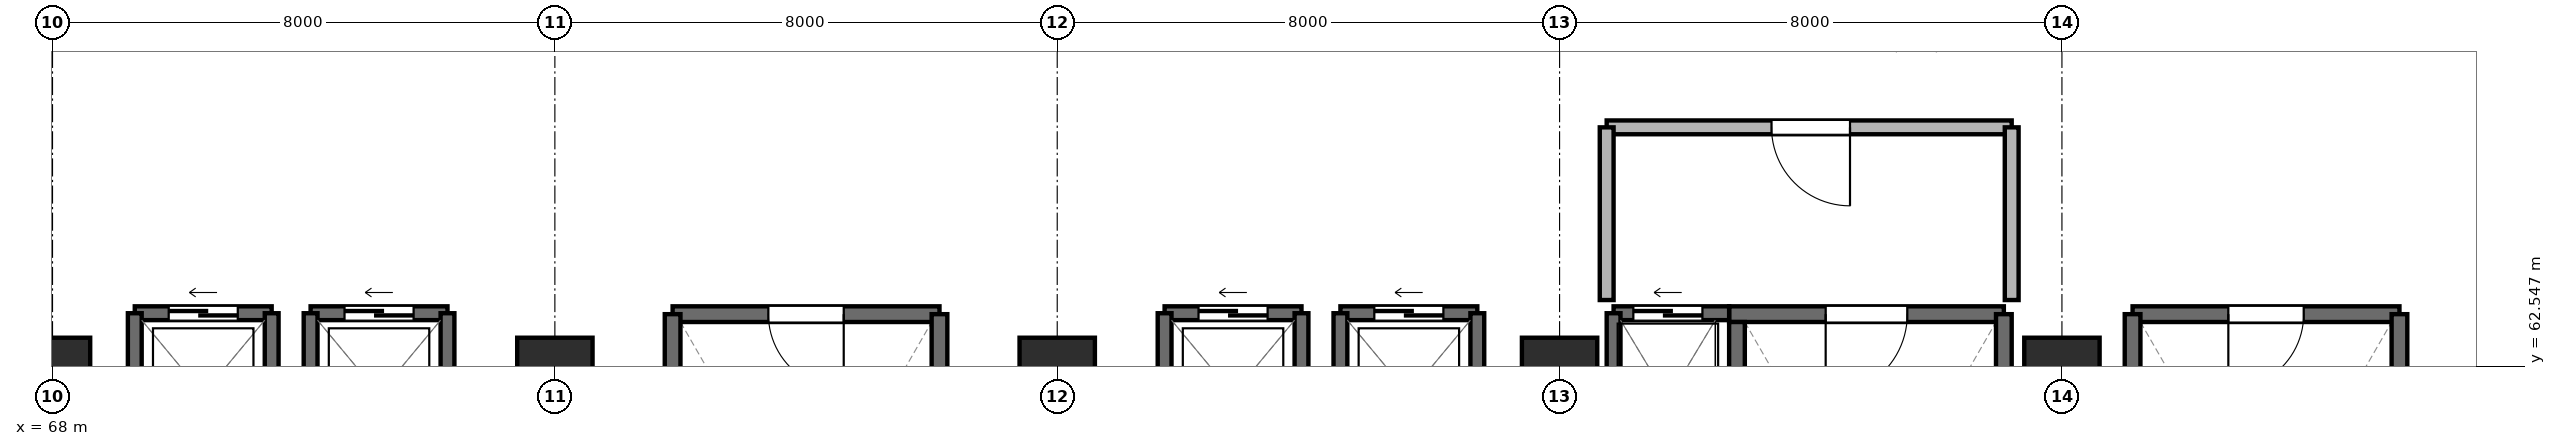
"""IFC4 building model, lengths in metres.
Left out: names, types, materials, properties, quantities, classifications, styles, units other than length and angle.
Written with IfcOpenShell. Run it as: python <this file> out.ifc"""

import sys

from ifc_helpers import new_model, si_unit, direction, frame, frame_2d, origin, origin_2d, place, context, subcontext, project, spatial, rectangle, extrude, element, fill, save


model = new_model("IFC4")
c1 = context("Model", 3, precision=1e-05, world=origin(), true_north=direction((0.0, 1.0)))
c2 = subcontext(c1, "Body", "Model", "MODEL_VIEW")
j1 = project(units=[si_unit("LENGTHUNIT", "METRE"), si_unit("PLANEANGLEUNIT", "RADIAN")], contexts=[c1])
p1 = place(None, origin())
s1 = spatial("IfcSite", under=j1, at=p1, CompositionType="ELEMENT")
p2 = place(p1, origin())
s2 = spatial("IfcBuilding", under=s1, at=p2, CompositionType="ELEMENT")
p3 = place(p2, frame((0.0, 0.0, -4.5)))
s3 = spatial("IfcBuildingStorey", under=s2, at=p3, CompositionType="ELEMENT", Elevation=-4.5)
for number, where, z_axis, x_axis in (
    (1, (68.0, 62.4, -0.32), (0.0, 0.0, 1.0), (1.0, 0.0, 0.0)),
    (2, (76.0, 62.4, -0.32), (0.0, 0.0, 1.0), (1.0, 0.0, 0.0)),
    (3, (84.0, 62.4, -0.32), (0.0, 0.0, 1.0), (1.0, 0.0, 0.0)),
    (4, (92.0, 62.4, -0.32), (0.0, 0.0, 1.0), (1.0, 0.0, 0.0)),
    (5, (100.0, 62.4, -0.32), (0.0, 0.0, 1.0), (1.0, 0.0, 0.0)),
):
    element("IfcColumn", number, at=place(p3, frame(where, z_axis=z_axis, x_axis=x_axis)), inside=s3, PredefinedType="COLUMN", context=c2, shape_type="SweptSolid", body=[
        extrude(rectangle(XDim=1.2, YDim=1.2, at=origin_2d()), origin(), (0.0, 0.0, 1.0), 4.47),
    ])
p4 = place(p3, frame((99.075, 63.375, 0.0), z_axis=(0.0, 0.0, 1.0), x_axis=(-1.0, 0.0, 0.0)))
e6 = element("IfcWall", 6, at=p4, inside=s3, PredefinedType="SHEAR", context=c2, shape_type="SweptSolid", body=[
    extrude(rectangle(XDim=4.375, YDim=0.25, at=frame_2d((2.188, 0.0))), origin(), (0.0, 0.0, 1.0), 4.15),
])
p5 = place(p4, frame((1.538, 0.0, 0.0)))
e7 = element("IfcOpeningElement", 7, at=p5, cuts=e6, PredefinedType="OPENING", context=c2, shape_type="SweptSolid", body=[
    extrude(rectangle(XDim=1.3, YDim=2.2, at=frame_2d((0.65, 1.1))), frame((0.0, 0.137, 0.0), z_axis=(0.0, -1.0, 0.0), x_axis=(1.0, 0.0, 0.0)), (0.0, 0.0, 1.0), 0.274),
])
p6 = place(p3, frame((94.825, 63.25, 0.0), z_axis=(0.0, 0.0, 1.0), x_axis=(0.0, -1.0, 0.0)))
e8 = element("IfcWall", 8, at=p6, inside=s3, PredefinedType="SHEAR", context=c2, shape_type="SweptSolid", body=[
    extrude(rectangle(XDim=7.075, YDim=0.25, at=frame_2d((3.538, 0.0))), origin(), (0.0, 0.0, 1.0), 4.15),
])
p7 = place(p3, frame((99.075, 56.175, 0.0), z_axis=(0.0, 0.0, 1.0), x_axis=(0.0, 1.0, 0.0)))
e9 = element("IfcWall", 9, at=p7, inside=s3, PredefinedType="SHEAR", context=c2, shape_type="SweptSolid", body=[
    extrude(rectangle(XDim=7.2, YDim=0.25, at=frame_2d((3.6, 0.0))), origin(), (0.0, 0.0, 1.0), 4.15),
])
p8 = place(p3, frame((82.125, 63.375, 0.0), z_axis=(0.0, 0.0, 1.0), x_axis=(-1.0, 0.0, 0.0)))
e10 = element("IfcWall", 10, at=p8, inside=s3, PredefinedType="SHEAR", context=c2, shape_type="SweptSolid", body=[
    extrude(rectangle(XDim=4.25, YDim=0.25, at=frame_2d((2.125, 0.0))), origin(), (0.0, 0.0, 1.0), 4.15),
])
p9 = place(p8, frame((1.525, 0.0, 0.0)))
e11 = element("IfcOpeningElement", 11, at=p9, cuts=e10, PredefinedType="OPENING", context=c2, shape_type="SweptSolid", body=[
    extrude(rectangle(XDim=1.2, YDim=2.2, at=frame_2d((0.6, 1.1))), frame((0.0, 0.137, 0.0), z_axis=(0.0, -1.0, 0.0), x_axis=(1.0, 0.0, 0.0)), (0.0, 0.0, 1.0), 0.274),
])
for number, where, z_axis, x_axis in (
    (12, (77.875, 63.375, 0.0), (0.0, 0.0, 1.0), (0.0, -1.0, 0.0)),
    (13, (82.125, 56.175, 0.0), (0.0, 0.0, 1.0), (0.0, 1.0, 0.0)),
):
    element("IfcWall", number, at=place(p3, frame(where, z_axis=z_axis, x_axis=x_axis)), inside=s3, PredefinedType="SHEAR", context=c2, shape_type="SweptSolid", body=[
        extrude(rectangle(XDim=7.2, YDim=0.25, at=frame_2d((3.6, 0.0))), origin(), (0.0, 0.0, 1.0), 4.15),
    ])
p10 = place(p3, frame((105.375, 63.375, 0.0), z_axis=(0.0, 0.0, 1.0), x_axis=(-1.0, 0.0, 0.0)))
e14 = element("IfcWall", 14, at=p10, inside=s3, PredefinedType="SHEAR", context=c2, shape_type="SweptSolid", body=[
    extrude(rectangle(XDim=4.25, YDim=0.25, at=frame_2d((2.125, 0.0))), origin(), (0.0, 0.0, 1.0), 4.15),
])
p11 = place(p10, frame((1.525, 0.0, 0.0)))
e15 = element("IfcOpeningElement", 15, at=p11, cuts=e14, PredefinedType="OPENING", context=c2, shape_type="SweptSolid", body=[
    extrude(rectangle(XDim=1.2, YDim=2.2, at=frame_2d((0.6, 1.1))), frame((0.0, 0.137, 0.0), z_axis=(0.0, -1.0, 0.0), x_axis=(1.0, 0.0, 0.0)), (0.0, 0.0, 1.0), 0.274),
])
for number, where, z_axis, x_axis in (
    (16, (101.125, 63.375, 0.0), (0.0, 0.0, 1.0), (0.0, -1.0, 0.0)),
    (17, (105.375, 56.175, 0.0), (0.0, 0.0, 1.0), (0.0, 1.0, 0.0)),
):
    element("IfcWall", number, at=place(p3, frame(where, z_axis=z_axis, x_axis=x_axis)), inside=s3, PredefinedType="SHEAR", context=c2, shape_type="SweptSolid", body=[
        extrude(rectangle(XDim=7.2, YDim=0.25, at=frame_2d((3.6, 0.0))), origin(), (0.0, 0.0, 1.0), 4.15),
    ])
p12 = place(p3, frame((94.7, 63.39, 0.0), z_axis=(0.0, 0.0, 1.0), x_axis=(-1.0, 0.0, 0.0)))
e18 = element("IfcWall", 18, at=p12, inside=s3, PredefinedType="SHEAR", context=c2, shape_type="SweptSolid", body=[
    extrude(rectangle(XDim=1.84, YDim=0.22, at=frame_2d((0.92, 0.0))), origin(), (0.0, 0.0, 1.0), 4.15),
])
p13 = place(p12, frame((0.425, 0.0, 0.0)))
e19 = element("IfcOpeningElement", 19, at=p13, cuts=e18, PredefinedType="OPENING", context=c2, shape_type="SweptSolid", body=[
    extrude(rectangle(XDim=1.1, YDim=2.2, at=frame_2d((0.55, 1.1))), frame((0.0, 0.122, 0.0), z_axis=(0.0, -1.0, 0.0), x_axis=(1.0, 0.0, 0.0)), (0.0, 0.0, 1.0), 0.244),
])
p14 = place(p3, frame((92.86, 63.39, 0.0), z_axis=(0.0, 0.0, 1.0), x_axis=(0.0, -1.0, 0.0)))
e20 = element("IfcWall", 20, at=p14, inside=s3, PredefinedType="SHEAR", context=c2, shape_type="SweptSolid", body=[
    extrude(rectangle(XDim=2.73, YDim=0.22, at=frame_2d((1.365, 0.0))), origin(), (0.0, 0.0, 1.0), 4.15),
])
p15 = place(p3, frame((71.49, 63.39, 0.0), z_axis=(0.0, 0.0, 1.0), x_axis=(-1.0, 0.0, 0.0)))
e21 = element("IfcWall", 21, at=p15, inside=s3, PredefinedType="SHEAR", context=c2, shape_type="SweptSolid", body=[
    extrude(rectangle(XDim=2.18, YDim=0.22, at=frame_2d((1.09, 0.0))), origin(), (0.0, 0.0, 1.0), 4.15),
])
p16 = place(p15, frame((0.54, 0.0, 0.0)))
e22 = element("IfcOpeningElement", 22, at=p16, cuts=e21, PredefinedType="OPENING", context=c2, shape_type="SweptSolid", body=[
    extrude(rectangle(XDim=1.1, YDim=2.2, at=frame_2d((0.55, 1.1))), frame((0.0, 0.122, 0.0), z_axis=(0.0, -1.0, 0.0), x_axis=(1.0, 0.0, 0.0)), (0.0, 0.0, 1.0), 0.244),
])
for number, where, z_axis, x_axis in (
    (23, (69.31, 63.39, 0.0), (0.0, 0.0, 1.0), (0.0, -1.0, 0.0)),
    (24, (71.49, 60.81, 0.0), (0.0, 0.0, 1.0), (0.0, 1.0, 0.0)),
):
    element("IfcWall", number, at=place(p3, frame(where, z_axis=z_axis, x_axis=x_axis)), inside=s3, PredefinedType="SHEAR", context=c2, shape_type="SweptSolid", body=[
        extrude(rectangle(XDim=2.58, YDim=0.22, at=frame_2d((1.29, 0.0))), origin(), (0.0, 0.0, 1.0), 4.15),
    ])
p17 = place(p3, frame((74.29, 63.39, 0.0), z_axis=(0.0, 0.0, 1.0), x_axis=(-1.0, 0.0, 0.0)))
e25 = element("IfcWall", 25, at=p17, inside=s3, PredefinedType="SHEAR", context=c2, shape_type="SweptSolid", body=[
    extrude(rectangle(XDim=2.18, YDim=0.22, at=frame_2d((1.09, 0.0))), origin(), (0.0, 0.0, 1.0), 4.15),
])
p18 = place(p17, frame((0.54, 0.0, 0.0)))
e26 = element("IfcOpeningElement", 26, at=p18, cuts=e25, PredefinedType="OPENING", context=c2, shape_type="SweptSolid", body=[
    extrude(rectangle(XDim=1.1, YDim=2.2, at=frame_2d((0.55, 1.1))), frame((0.0, 0.122, 0.0), z_axis=(0.0, -1.0, 0.0), x_axis=(1.0, 0.0, 0.0)), (0.0, 0.0, 1.0), 0.244),
])
for number, where, z_axis, x_axis in (
    (27, (72.11, 63.39, 0.0), (0.0, 0.0, 1.0), (0.0, -1.0, 0.0)),
    (28, (74.29, 60.81, 0.0), (0.0, 0.0, 1.0), (0.0, 1.0, 0.0)),
):
    element("IfcWall", number, at=place(p3, frame(where, z_axis=z_axis, x_axis=x_axis)), inside=s3, PredefinedType="SHEAR", context=c2, shape_type="SweptSolid", body=[
        extrude(rectangle(XDim=2.58, YDim=0.22, at=frame_2d((1.29, 0.0))), origin(), (0.0, 0.0, 1.0), 4.15),
    ])
p19 = place(p3, frame((87.89, 63.39, 0.0), z_axis=(0.0, 0.0, 1.0), x_axis=(-1.0, 0.0, 0.0)))
e29 = element("IfcWall", 29, at=p19, inside=s3, PredefinedType="SHEAR", context=c2, shape_type="SweptSolid", body=[
    extrude(rectangle(XDim=2.18, YDim=0.22, at=frame_2d((1.09, 0.0))), origin(), (0.0, 0.0, 1.0), 4.15),
])
p20 = place(p19, frame((0.54, 0.0, 0.0)))
e30 = element("IfcOpeningElement", 30, at=p20, cuts=e29, PredefinedType="OPENING", context=c2, shape_type="SweptSolid", body=[
    extrude(rectangle(XDim=1.1, YDim=2.2, at=frame_2d((0.55, 1.1))), frame((0.0, 0.122, 0.0), z_axis=(0.0, -1.0, 0.0), x_axis=(1.0, 0.0, 0.0)), (0.0, 0.0, 1.0), 0.244),
])
for number, where, z_axis, x_axis in (
    (31, (85.71, 63.39, 0.0), (0.0, 0.0, 1.0), (0.0, -1.0, 0.0)),
    (32, (87.89, 60.81, 0.0), (0.0, 0.0, 1.0), (0.0, 1.0, 0.0)),
):
    element("IfcWall", number, at=place(p3, frame(where, z_axis=z_axis, x_axis=x_axis)), inside=s3, PredefinedType="SHEAR", context=c2, shape_type="SweptSolid", body=[
        extrude(rectangle(XDim=2.58, YDim=0.22, at=frame_2d((1.29, 0.0))), origin(), (0.0, 0.0, 1.0), 4.15),
    ])
p21 = place(p3, frame((90.69, 63.39, 0.0), z_axis=(0.0, 0.0, 1.0), x_axis=(-1.0, 0.0, 0.0)))
e33 = element("IfcWall", 33, at=p21, inside=s3, PredefinedType="SHEAR", context=c2, shape_type="SweptSolid", body=[
    extrude(rectangle(XDim=2.18, YDim=0.22, at=frame_2d((1.09, 0.0))), origin(), (0.0, 0.0, 1.0), 4.15),
])
p22 = place(p21, frame((0.54, 0.0, 0.0)))
e34 = element("IfcOpeningElement", 34, at=p22, cuts=e33, PredefinedType="OPENING", context=c2, shape_type="SweptSolid", body=[
    extrude(rectangle(XDim=1.1, YDim=2.2, at=frame_2d((0.55, 1.1))), frame((0.0, 0.122, 0.0), z_axis=(0.0, -1.0, 0.0), x_axis=(1.0, 0.0, 0.0)), (0.0, 0.0, 1.0), 0.244),
])
for number, where, z_axis, x_axis in (
    (35, (88.51, 63.39, 0.0), (0.0, 0.0, 1.0), (0.0, -1.0, 0.0)),
    (36, (90.69, 60.81, 0.0), (0.0, 0.0, 1.0), (0.0, 1.0, 0.0)),
):
    element("IfcWall", number, at=place(p3, frame(where, z_axis=z_axis, x_axis=x_axis)), inside=s3, PredefinedType="SHEAR", context=c2, shape_type="SweptSolid", body=[
        extrude(rectangle(XDim=2.58, YDim=0.22, at=frame_2d((1.29, 0.0))), origin(), (0.0, 0.0, 1.0), 4.15),
    ])
p23 = place(p3, frame((92.75, 66.35, 0.0), z_axis=(0.0, 0.0, 1.0), x_axis=(1.0, 0.0, 0.0)))
e37 = element("IfcWall", 37, at=p23, inside=s3, PredefinedType="PARTITIONING", context=c2, shape_type="SweptSolid", body=[
    extrude(rectangle(XDim=6.45, YDim=0.22, at=frame_2d((3.225, 0.0))), origin(), (0.0, 0.0, 1.0), 3.78),
])
p24 = place(p23, frame((2.625, 0.0, 0.0)))
e38 = element("IfcOpeningElement", 38, at=p24, cuts=e37, PredefinedType="OPENING", context=c2, shape_type="SweptSolid", body=[
    extrude(rectangle(XDim=1.25, YDim=2.2, at=frame_2d((0.625, 1.1))), frame((0.0, 0.122, 0.0), z_axis=(0.0, -1.0, 0.0), x_axis=(1.0, 0.0, 0.0)), (0.0, 0.0, 1.0), 0.244),
])
for number, where, z_axis, x_axis in (
    (39, (92.75, 63.6, 0.0), (0.0, 0.0, 1.0), (0.0, 1.0, 0.0)),
    (40, (99.2, 63.6, 0.0), (0.0, 0.0, 1.0), (0.0, 1.0, 0.0)),
):
    element("IfcWall", number, at=place(p3, frame(where, z_axis=z_axis, x_axis=x_axis)), inside=s3, PredefinedType="PARTITIONING", context=c2, shape_type="SweptSolid", body=[
        extrude(rectangle(XDim=2.75, YDim=0.22, at=frame_2d((1.375, 0.0))), origin(), (0.0, 0.0, 1.0), 3.78),
    ])
p25 = place(p5, origin())
e41 = element("IfcDoor", 41, at=p25, inside=s3, OperationType="SINGLE_SWING_RIGHT", PredefinedType="DOOR", context=c2, shape_type="SweptSolid", body=[
    extrude(rectangle(XDim=1.3, YDim=2.2, at=frame_2d((0.65, 1.1))), frame((0.0, 0.025, 0.0), z_axis=(0.0, -1.0, 0.0), x_axis=(1.0, 0.0, 0.0)), (0.0, 0.0, 1.0), 0.05),
])
fill(e7, e41)
p26 = place(p9, origin())
e42 = element("IfcDoor", 42, at=p26, inside=s3, OperationType="SINGLE_SWING_LEFT", PredefinedType="DOOR", context=c2, shape_type="SweptSolid", body=[
    extrude(rectangle(XDim=1.2, YDim=2.2, at=frame_2d((0.6, 1.1))), frame((0.0, 0.025, 0.0), z_axis=(0.0, -1.0, 0.0), x_axis=(1.0, 0.0, 0.0)), (0.0, 0.0, 1.0), 0.05),
])
fill(e11, e42)
p27 = place(p11, origin())
e43 = element("IfcDoor", 43, at=p27, inside=s3, OperationType="SINGLE_SWING_RIGHT", PredefinedType="DOOR", context=c2, shape_type="SweptSolid", body=[
    extrude(rectangle(XDim=1.2, YDim=2.2, at=frame_2d((0.6, 1.1))), frame((0.0, 0.025, 0.0), z_axis=(0.0, -1.0, 0.0), x_axis=(1.0, 0.0, 0.0)), (0.0, 0.0, 1.0), 0.05),
])
fill(e15, e43)
p28 = place(p13, origin())
e44 = element("IfcDoor", 44, at=p28, inside=s3, OperationType="SLIDING_TO_RIGHT", PredefinedType="DOOR", context=c2, shape_type="SweptSolid", body=[
    extrude(rectangle(XDim=1.1, YDim=2.2, at=frame_2d((0.55, 1.1))), frame((0.0, 0.025, 0.0), z_axis=(0.0, -1.0, 0.0), x_axis=(1.0, 0.0, 0.0)), (0.0, 0.0, 1.0), 0.05),
])
fill(e19, e44)
p29 = place(p16, origin())
e45 = element("IfcDoor", 45, at=p29, inside=s3, OperationType="SLIDING_TO_RIGHT", PredefinedType="DOOR", context=c2, shape_type="SweptSolid", body=[
    extrude(rectangle(XDim=1.1, YDim=2.2, at=frame_2d((0.55, 1.1))), frame((0.0, 0.025, 0.0), z_axis=(0.0, -1.0, 0.0), x_axis=(1.0, 0.0, 0.0)), (0.0, 0.0, 1.0), 0.05),
])
fill(e22, e45)
p30 = place(p18, origin())
e46 = element("IfcDoor", 46, at=p30, inside=s3, OperationType="SLIDING_TO_RIGHT", PredefinedType="DOOR", context=c2, shape_type="SweptSolid", body=[
    extrude(rectangle(XDim=1.1, YDim=2.2, at=frame_2d((0.55, 1.1))), frame((0.0, 0.025, 0.0), z_axis=(0.0, -1.0, 0.0), x_axis=(1.0, 0.0, 0.0)), (0.0, 0.0, 1.0), 0.05),
])
fill(e26, e46)
p31 = place(p20, origin())
e47 = element("IfcDoor", 47, at=p31, inside=s3, OperationType="SLIDING_TO_RIGHT", PredefinedType="DOOR", context=c2, shape_type="SweptSolid", body=[
    extrude(rectangle(XDim=1.1, YDim=2.2, at=frame_2d((0.55, 1.1))), frame((0.0, 0.025, 0.0), z_axis=(0.0, -1.0, 0.0), x_axis=(1.0, 0.0, 0.0)), (0.0, 0.0, 1.0), 0.05),
])
fill(e30, e47)
p32 = place(p22, origin())
e48 = element("IfcDoor", 48, at=p32, inside=s3, OperationType="SLIDING_TO_RIGHT", PredefinedType="DOOR", context=c2, shape_type="SweptSolid", body=[
    extrude(rectangle(XDim=1.1, YDim=2.2, at=frame_2d((0.55, 1.1))), frame((0.0, 0.025, 0.0), z_axis=(0.0, -1.0, 0.0), x_axis=(1.0, 0.0, 0.0)), (0.0, 0.0, 1.0), 0.05),
])
fill(e34, e48)
p33 = place(p24, frame((1.25, 0.0, 0.0), z_axis=(0.0, 0.0, 1.0), x_axis=(-1.0, 0.0, 0.0)))
e49 = element("IfcDoor", 49, at=p33, inside=s3, OperationType="SINGLE_SWING_RIGHT", PredefinedType="DOOR", context=c2, shape_type="SweptSolid", body=[
    extrude(rectangle(XDim=1.25, YDim=2.2, at=frame_2d((0.625, 1.1))), frame((0.0, 0.025, 0.0), z_axis=(0.0, -1.0, 0.0), x_axis=(1.0, 0.0, 0.0)), (0.0, 0.0, 1.0), 0.05),
])
fill(e38, e49)
save(model, sys.argv[1])
